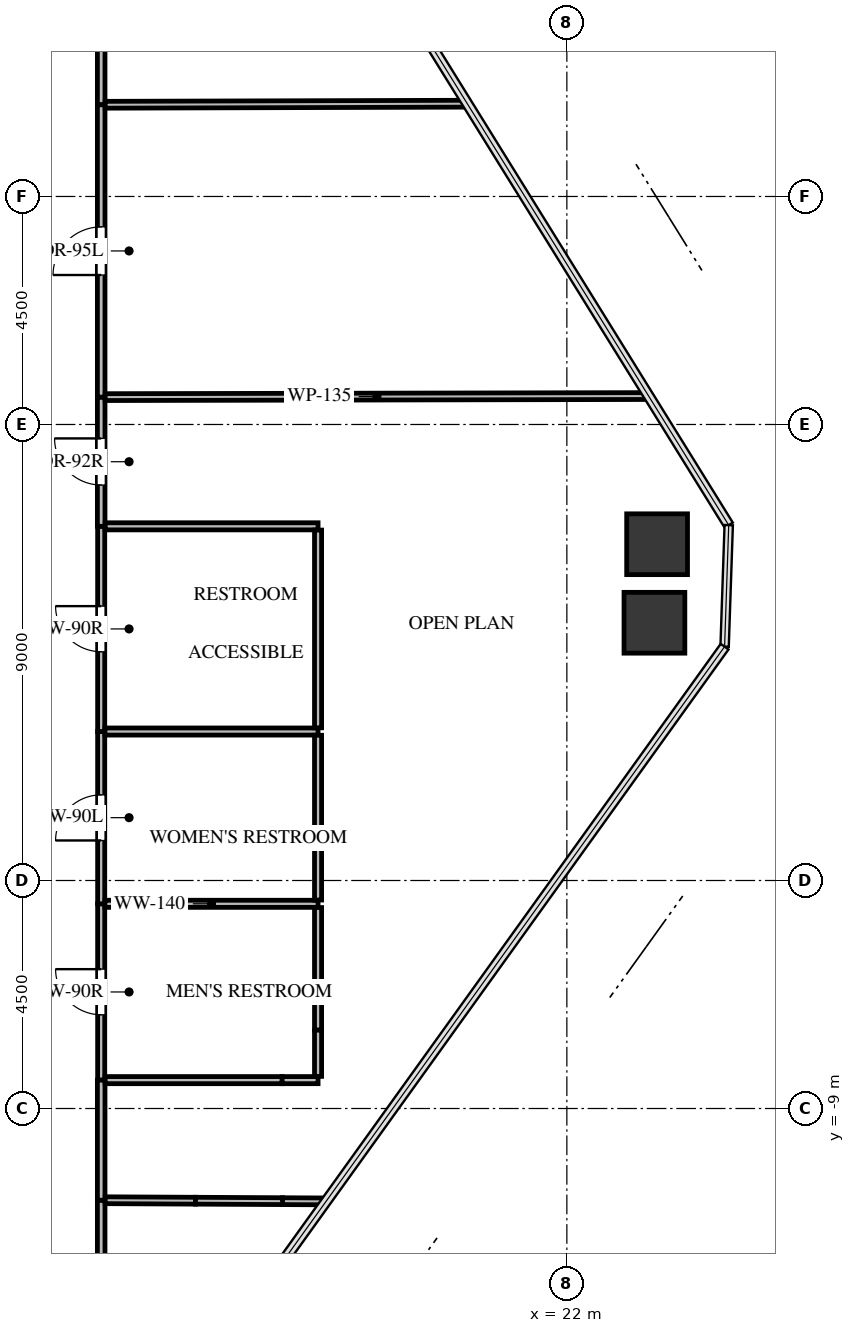
"""IFC4 building model, lengths in metres.
Left out: names, types, materials, properties, quantities, classifications, styles, units other than length and angle.
Written with IfcOpenShell. Run it as: python <this file> out.ifc"""

import sys

from ifc_helpers import new_model, si_unit, direction, frame, frame_2d, origin, origin_2d, place, context, subcontext, project, spatial, rectangle, extrude, source, transform, mapped, element, fill, save


model = new_model("IFC4")
c1 = context("Model", 3, precision=1e-05, world=origin(), true_north=direction((0.0, 1.0)))
c2 = subcontext(c1, "Body", "Model", "MODEL_VIEW")
j1 = project(units=[si_unit("LENGTHUNIT", "METRE"), si_unit("PLANEANGLEUNIT", "RADIAN")], contexts=[c1])
p1 = place(None, origin())
s1 = spatial("IfcSite", under=j1, at=p1, CompositionType="ELEMENT")
p2 = place(p1, origin())
s2 = spatial("IfcBuilding", under=s1, at=p2, CompositionType="ELEMENT")
p3 = place(p2, frame((0.0, 0.0, 146.1)))
s3 = spatial("IfcBuildingStorey", under=s2, at=p3, CompositionType="ELEMENT", Elevation=146.1)
m1 = source(origin(), c2, "Body", "SweptSolid", [
    extrude(rectangle(XDim=1.2, YDim=1.2, at=origin_2d()), origin(), (0.0, 0.0, 1.0), 4.12),
])
for number, where, z_axis, x_axis in (
    (1, (23.781, 2.137, -0.24), (0.0, 0.0, 1.0), (1.0, 0.0, 0.0)),
    (2, (23.728, 0.587, -0.24), (0.0, 0.0, 1.0), (1.0, 0.0, 0.0)),
):
    element("IfcColumn", number, at=place(p3, frame(where, z_axis=z_axis, x_axis=x_axis)), inside=s3, PredefinedType="COLUMN", context=c2, shape_type="MappedRepresentation", body=[
        mapped(m1, transform((0.0, 0.0, 0.0), x_axis=(1.0, 0.0, 0.0), y_axis=(0.0, 1.0, 0.0), z_axis=(0.0, 0.0, 1.0), scale=1.0)),
    ])
p4 = place(p3, frame((12.81, -8.44, 0.0), z_axis=(0.0, 0.0, 1.0), x_axis=(0.0, 1.0, 0.0)))
e3 = element("IfcWall", 3, at=p4, inside=s3, PredefinedType="PARTITIONING", context=c2, shape_type="SweptSolid", body=[
    extrude(rectangle(XDim=3.48, YDim=0.14, at=frame_2d((1.74, 0.0))), origin(), (0.0, 0.0, 1.0), 3.865),
])
p5 = place(p4, frame((1.29, 0.0, 0.0)))
e4 = element("IfcOpeningElement", 4, at=p5, cuts=e3, PredefinedType="OPENING", context=c2, shape_type="SweptSolid", body=[
    extrude(rectangle(XDim=0.9, YDim=2.05, at=frame_2d((0.45, 1.025))), frame((0.0, 0.08, 0.0), z_axis=(0.0, -1.0, 0.0), x_axis=(1.0, 0.0, 0.0)), (0.0, 0.0, 1.0), 0.16),
])
p6 = place(p3, frame((12.81, -4.96, 0.0), z_axis=(0.0, 0.0, 1.0), x_axis=(0.0, 1.0, 0.0)))
e5 = element("IfcWall", 5, at=p6, inside=s3, PredefinedType="PARTITIONING", context=c2, shape_type="SweptSolid", body=[
    extrude(rectangle(XDim=3.4, YDim=0.14, at=frame_2d((1.7, 0.0))), origin(), (0.0, 0.0, 1.0), 3.865),
])
p7 = place(p6, frame((1.25, 0.0, 0.0)))
e6 = element("IfcOpeningElement", 6, at=p7, cuts=e5, PredefinedType="OPENING", context=c2, shape_type="SweptSolid", body=[
    extrude(rectangle(XDim=0.9, YDim=2.05, at=frame_2d((0.45, 1.025))), frame((0.0, 0.08, 0.0), z_axis=(0.0, -1.0, 0.0), x_axis=(1.0, 0.0, 0.0)), (0.0, 0.0, 1.0), 0.16),
])
p8 = place(p3, frame((12.81, -1.56, 0.0), z_axis=(0.0, 0.0, 1.0), x_axis=(0.0, 1.0, 0.0)))
e7 = element("IfcWall", 7, at=p8, inside=s3, PredefinedType="PARTITIONING", context=c2, shape_type="SweptSolid", body=[
    extrude(rectangle(XDim=4.05, YDim=0.14, at=frame_2d((2.025, 0.0))), origin(), (0.0, 0.0, 1.0), 2.3),
])
p9 = place(p8, frame((1.575, 0.0, 0.0)))
e8 = element("IfcOpeningElement", 8, at=p9, cuts=e7, PredefinedType="OPENING", context=c2, shape_type="SweptSolid", body=[
    extrude(rectangle(XDim=0.9, YDim=2.05, at=frame_2d((0.45, 1.025))), frame((0.0, 0.08, 0.0), z_axis=(0.0, -1.0, 0.0), x_axis=(1.0, 0.0, 0.0)), (0.0, 0.0, 1.0), 0.16),
])
for number, where, z_axis, x_axis in (
    (9, (12.81, 10.81, 0.0), (0.0, 0.0, 1.0), (0.0, 1.0, 0.0)),
    (10, (12.81, -12.081, 0.0), (0.0, 0.0, 1.0), (0.0, 1.0, 0.0)),
):
    element("IfcWall", number, at=place(p3, frame(where, z_axis=z_axis, x_axis=x_axis)), inside=s3, PredefinedType="PARTITIONING", context=c2, shape_type="SweptSolid", body=[
        extrude(rectangle(XDim=1.271, YDim=0.15, at=frame_2d((0.635, 0.0))), origin(), (0.0, 0.0, 1.0), 3.865),
    ])
p10 = place(p3, frame((12.81, 2.49, 0.0), z_axis=(0.0, 0.0, 1.0), x_axis=(0.0, 1.0, 0.0)))
e11 = element("IfcWall", 11, at=p10, inside=s3, PredefinedType="PARTITIONING", context=c2, shape_type="SweptSolid", body=[
    extrude(rectangle(XDim=2.55, YDim=0.15, at=frame_2d((1.275, 0.0))), origin(), (0.0, 0.0, 1.0), 3.865),
])
p11 = place(p10, frame((0.815, 0.0, 0.0)))
e12 = element("IfcOpeningElement", 12, at=p11, cuts=e11, PredefinedType="OPENING", context=c2, shape_type="SweptSolid", body=[
    extrude(rectangle(XDim=0.92, YDim=2.1, at=frame_2d((0.46, 1.05))), frame((0.0, 0.085, 0.0), z_axis=(0.0, -1.0, 0.0), x_axis=(1.0, 0.0, 0.0)), (0.0, 0.0, 1.0), 0.17),
])
p12 = place(p3, frame((12.81, -10.81, 0.0), z_axis=(0.0, 0.0, 1.0), x_axis=(0.0, 1.0, 0.0)))
e13 = element("IfcWall", 13, at=p12, inside=s3, PredefinedType="PARTITIONING", context=c2, shape_type="SweptSolid", body=[
    extrude(rectangle(XDim=2.37, YDim=0.15, at=frame_2d((1.185, 0.0))), origin(), (0.0, 0.0, 1.0), 3.865),
])
p13 = place(p3, frame((12.81, 5.04, 0.0), z_axis=(0.0, 0.0, 1.0), x_axis=(0.0, 1.0, 0.0)))
e14 = element("IfcWall", 14, at=p13, inside=s3, PredefinedType="PARTITIONING", context=c2, shape_type="SweptSolid", body=[
    extrude(rectangle(XDim=5.77, YDim=0.15, at=frame_2d((2.885, 0.0))), origin(), (0.0, 0.0, 1.0), 3.865),
])
p14 = place(p13, frame((2.41, 0.0, 0.0)))
e15 = element("IfcOpeningElement", 15, at=p14, cuts=e14, PredefinedType="OPENING", context=c2, shape_type="SweptSolid", body=[
    extrude(rectangle(XDim=0.95, YDim=2.1, at=frame_2d((0.475, 1.05))), frame((0.0, 0.085, 0.0), z_axis=(0.0, -1.0, 0.0), x_axis=(1.0, 0.0, 0.0)), (0.0, 0.0, 1.0), 0.17),
])
p15 = place(p3, frame((12.884, -4.96, 0.0), z_axis=(0.0, 0.0, 1.0), x_axis=(1.0, 0.0, 0.0)))
e16 = element("IfcWall", 16, at=p15, inside=s3, PredefinedType="PARTITIONING", context=c2, shape_type="SweptSolid", body=[
    extrude(rectangle(XDim=4.206, YDim=0.14, at=frame_2d((2.103, 0.0))), origin(), (0.0, 0.0, 1.0), 3.865),
])
p16 = place(p3, frame((16.381, -8.44, 0.0), z_axis=(0.0, 0.0, 1.0), x_axis=(-1.0, 0.0, 0.0)))
e17 = element("IfcWall", 17, at=p16, inside=s3, PredefinedType="PARTITIONING", context=c2, shape_type="SweptSolid", body=[
    extrude(rectangle(XDim=3.492, YDim=0.14, at=frame_2d((1.746, 0.0))), origin(), (0.0, 0.0, 1.0), 3.865),
])
p17 = place(p3, frame((17.09, -8.44, 0.0), z_axis=(0.0, 0.0, 1.0), x_axis=(-1.0, 0.0, 0.0)))
e18 = element("IfcWall", 18, at=p17, inside=s3, PredefinedType="PARTITIONING", context=c2, shape_type="SweptSolid", body=[
    extrude(rectangle(XDim=0.709, YDim=0.14, at=frame_2d((0.354, 0.0))), origin(), (0.0, 0.0, 1.0), 1.9),
])
p18 = place(p3, frame((17.09, -5.034, 0.0), z_axis=(0.0, 0.0, 1.0), x_axis=(0.0, -1.0, 0.0)))
e19 = element("IfcWall", 19, at=p18, inside=s3, PredefinedType="PARTITIONING", context=c2, shape_type="SweptSolid", body=[
    extrude(rectangle(XDim=2.42, YDim=0.14, at=frame_2d((1.21, 0.0))), origin(), (0.0, 0.0, 1.0), 1.9),
])
p19 = place(p3, frame((17.09, -7.454, 0.0), z_axis=(0.0, 0.0, 1.0), x_axis=(0.0, -1.0, 0.0)))
e20 = element("IfcWall", 20, at=p19, inside=s3, PredefinedType="PARTITIONING", context=c2, shape_type="SweptSolid", body=[
    extrude(rectangle(XDim=0.912, YDim=0.14, at=frame_2d((0.456, 0.0))), origin(), (0.0, 0.0, 1.0), 1.9),
])
p20 = place(p3, frame((12.884, -1.56, 0.0), z_axis=(0.0, 0.0, 1.0), x_axis=(1.0, 0.0, 0.0)))
e21 = element("IfcWall", 21, at=p20, inside=s3, PredefinedType="PARTITIONING", context=c2, shape_type="SweptSolid", body=[
    extrude(rectangle(XDim=4.206, YDim=0.14, at=frame_2d((2.103, 0.0))), origin(), (0.0, 0.0, 1.0), 3.865),
])
p21 = place(p3, frame((17.09, -1.634, 0.0), z_axis=(0.0, 0.0, 1.0), x_axis=(0.0, -1.0, 0.0)))
e22 = element("IfcWall", 22, at=p21, inside=s3, PredefinedType="PARTITIONING", context=c2, shape_type="SweptSolid", body=[
    extrude(rectangle(XDim=3.252, YDim=0.14, at=frame_2d((1.626, 0.0))), origin(), (0.0, 0.0, 1.0), 3.865),
])
p22 = place(p3, frame((12.889, 2.49, 0.0), z_axis=(0.0, 0.0, 1.0), x_axis=(1.0, 0.0, 0.0)))
e23 = element("IfcWall", 23, at=p22, inside=s3, PredefinedType="PARTITIONING", context=c2, shape_type="SweptSolid", body=[
    extrude(rectangle(XDim=4.201, YDim=0.14, at=frame_2d((2.101, 0.0))), origin(), (0.0, 0.0, 1.0), 3.865),
])
p23 = place(p3, frame((17.09, 2.416, 0.0), z_axis=(0.0, 0.0, 1.0), x_axis=(0.0, -1.0, 0.0)))
e24 = element("IfcWall", 24, at=p23, inside=s3, PredefinedType="PARTITIONING", context=c2, shape_type="SweptSolid", body=[
    extrude(rectangle(XDim=3.902, YDim=0.14, at=frame_2d((1.951, 0.0))), origin(), (0.0, 0.0, 1.0), 2.3),
])
p24 = place(p3, frame((20.035, 10.831, 0.0), z_axis=(0.0, 0.0, 1.0), x_axis=(-0.999995783715, -0.002903885812, 0.0)))
e25 = element("IfcWall", 25, at=p24, inside=s3, PredefinedType="PARTITIONING", context=c2, shape_type="SweptSolid", body=[
    extrude(rectangle(XDim=7.146, YDim=0.135, at=frame_2d((3.573, 0.0))), origin(), (0.0, 0.0, 1.0), 2.3),
])
p25 = place(p3, frame((12.889, -10.81, 0.0), z_axis=(0.0, 0.0, 1.0), x_axis=(0.999985737151, -0.005340926287, 0.0)))
e26 = element("IfcWall", 26, at=p25, inside=s3, PredefinedType="PARTITIONING", context=c2, shape_type="SweptSolid", body=[
    extrude(rectangle(XDim=1.783, YDim=0.135, at=frame_2d((0.891, 0.0))), origin(), (0.0, 0.0, 1.0), 3.865),
])
p26 = place(p3, frame((16.389, -10.829, 0.0), z_axis=(0.0, 0.0, 1.0), x_axis=(0.999986910748, -0.005116476519, 0.0)))
e27 = element("IfcWall", 27, at=p26, inside=s3, PredefinedType="PARTITIONING", context=c2, shape_type="SweptSolid", body=[
    extrude(rectangle(XDim=0.859, YDim=0.135, at=frame_2d((0.429, 0.0))), origin(), (0.0, 0.0, 1.0), 3.865),
])
p27 = place(p3, frame((14.672, -10.82, 0.0), z_axis=(0.0, 0.0, 1.0), x_axis=(0.99998616562, -0.005260092142, 0.0)))
e28 = element("IfcWall", 28, at=p27, inside=s3, PredefinedType="PARTITIONING", context=c2, shape_type="SweptSolid", body=[
    extrude(rectangle(XDim=1.717, YDim=0.135, at=frame_2d((0.859, 0.0))), origin(), (0.0, 0.0, 1.0), 1.9),
])
p28 = place(p3, frame((12.889, 5.04, 0.0), z_axis=(0.0, 0.0, 1.0), x_axis=(0.999998128178, 0.00193484876, 0.0)))
e29 = element("IfcWall", 29, at=p28, inside=s3, PredefinedType="PARTITIONING", context=c2, shape_type="SweptSolid", body=[
    extrude(rectangle(XDim=10.725, YDim=0.135, at=frame_2d((5.363, 0.0))), origin(), (0.0, 0.0, 1.0), 2.3),
])
m2 = source(origin(), c2, "Body", "SweptSolid", [
    extrude(rectangle(XDim=0.9, YDim=2.05, at=frame_2d((0.45, 1.025))), frame((0.0, 0.025, 0.0), z_axis=(0.0, -1.0, 0.0), x_axis=(1.0, 0.0, 0.0)), (0.0, 0.0, 1.0), 0.05),
])
p29 = place(p5, origin())
e30 = element("IfcDoor", 30, at=p29, inside=s3, OperationType="SINGLE_SWING_RIGHT", PredefinedType="DOOR", context=c2, shape_type="MappedRepresentation", body=[
    mapped(m2, transform((0.0, 0.0, 0.0), x_axis=(1.0, 0.0, 0.0), y_axis=(0.0, 1.0, 0.0), z_axis=(0.0, 0.0, 1.0), scale=1.0)),
])
fill(e4, e30)
m3 = source(origin(), c2, "Body", "SweptSolid", [
    extrude(rectangle(XDim=0.9, YDim=2.05, at=frame_2d((0.45, 1.025))), frame((0.0, 0.025, 0.0), z_axis=(0.0, -1.0, 0.0), x_axis=(1.0, 0.0, 0.0)), (0.0, 0.0, 1.0), 0.05),
])
p30 = place(p7, origin())
e31 = element("IfcDoor", 31, at=p30, inside=s3, OperationType="SINGLE_SWING_LEFT", PredefinedType="DOOR", context=c2, shape_type="MappedRepresentation", body=[
    mapped(m3, transform((0.0, 0.0, 0.0), x_axis=(1.0, 0.0, 0.0), y_axis=(0.0, 1.0, 0.0), z_axis=(0.0, 0.0, 1.0), scale=1.0)),
])
fill(e6, e31)
p31 = place(p9, origin())
e32 = element("IfcDoor", 32, at=p31, inside=s3, OperationType="SINGLE_SWING_RIGHT", PredefinedType="DOOR", context=c2, shape_type="MappedRepresentation", body=[
    mapped(m2, transform((0.0, 0.0, 0.0), x_axis=(1.0, 0.0, 0.0), y_axis=(0.0, 1.0, 0.0), z_axis=(0.0, 0.0, 1.0), scale=1.0)),
])
fill(e8, e32)
m4 = source(origin(), c2, "Body", "SweptSolid", [
    extrude(rectangle(XDim=0.92, YDim=2.1, at=frame_2d((0.46, 1.05))), frame((0.0, 0.025, 0.0), z_axis=(0.0, -1.0, 0.0), x_axis=(1.0, 0.0, 0.0)), (0.0, 0.0, 1.0), 0.05),
])
p32 = place(p11, origin())
e33 = element("IfcDoor", 33, at=p32, inside=s3, OperationType="SINGLE_SWING_RIGHT", PredefinedType="DOOR", context=c2, shape_type="MappedRepresentation", body=[
    mapped(m4, transform((0.0, 0.0, 0.0), x_axis=(1.0, 0.0, 0.0), y_axis=(0.0, 1.0, 0.0), z_axis=(0.0, 0.0, 1.0), scale=1.0)),
])
fill(e12, e33)
m5 = source(origin(), c2, "Body", "SweptSolid", [
    extrude(rectangle(XDim=0.95, YDim=2.1, at=frame_2d((0.475, 1.05))), frame((0.0, 0.025, 0.0), z_axis=(0.0, -1.0, 0.0), x_axis=(1.0, 0.0, 0.0)), (0.0, 0.0, 1.0), 0.05),
])
p33 = place(p14, origin())
e34 = element("IfcDoor", 34, at=p33, inside=s3, OperationType="SINGLE_SWING_LEFT", PredefinedType="DOOR", context=c2, shape_type="MappedRepresentation", body=[
    mapped(m5, transform((0.0, 0.0, 0.0), x_axis=(1.0, 0.0, 0.0), y_axis=(0.0, 1.0, 0.0), z_axis=(0.0, 0.0, 1.0), scale=1.0)),
])
fill(e15, e34)
save(model, sys.argv[1])
